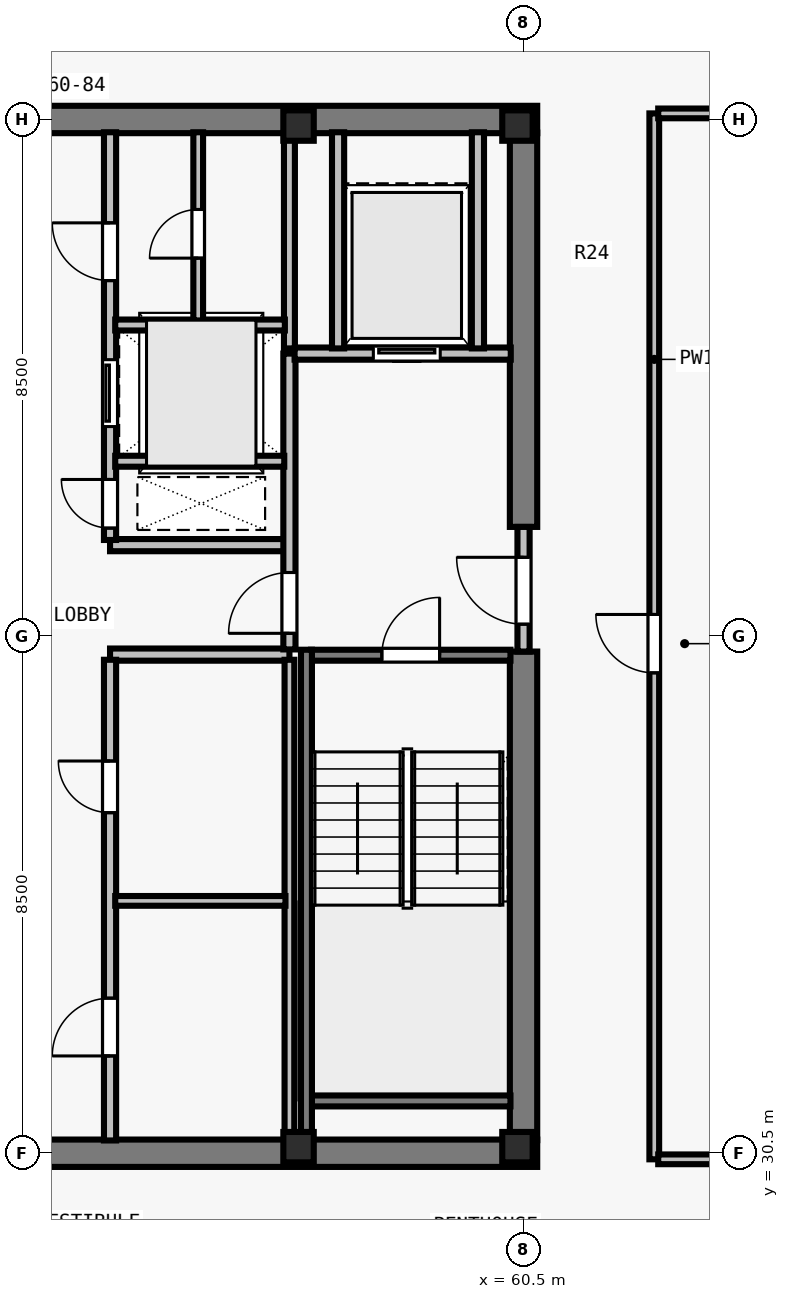
"""IFC4 building model, lengths in metres.
Left out: names, types, materials, properties, quantities, classifications, styles, units other than length and angle.
Written with IfcOpenShell. Run it as: python <this file> out.ifc"""

import sys

from ifc_helpers import new_model, si_unit, direction, frame, frame_2d, origin, origin_2d, place, context, subcontext, project, spatial, rectangle, i_section, extrude, element, fill, save


model = new_model("IFC4")
c1 = context("Model", 3, precision=1e-05, world=origin(), true_north=direction((0.0, 1.0)))
c2 = subcontext(c1, "Body", "Model", "MODEL_VIEW")
j1 = project(units=[si_unit("LENGTHUNIT", "METRE"), si_unit("PLANEANGLEUNIT", "RADIAN")], contexts=[c1])
p1 = place(None, origin())
s1 = spatial("IfcSite", under=j1, at=p1, CompositionType="ELEMENT")
p2 = place(p1, origin())
s2 = spatial("IfcBuilding", under=s1, at=p2, CompositionType="ELEMENT")
p3 = place(p2, frame((0.0, 0.0, 294.5)))
s3 = spatial("IfcBuildingStorey", under=s2, at=p3, CompositionType="ELEMENT", Elevation=294.5)
for number, where, z_axis, x_axis in (
    (1, (56.8, 30.6, 0.0), (0.0, 0.0, 1.0), (1.0, 0.0, 0.0)),
    (2, (60.4, 30.6, 0.0), (0.0, 0.0, 1.0), (1.0, 0.0, 0.0)),
    (3, (56.8, 47.4, 0.0), (0.0, 0.0, 1.0), (1.0, 0.0, 0.0)),
    (4, (60.4, 47.4, 0.0), (0.0, 0.0, 1.0), (1.0, 0.0, 0.0)),
):
    element("IfcColumn", number, at=place(p3, frame(where, z_axis=z_axis, x_axis=x_axis)), inside=s3, PredefinedType="COLUMN", context=c2, shape_type="SweptSolid", body=[
        extrude(i_section(OverallWidth=0.5, OverallDepth=0.5, WebThickness=0.028, FlangeThickness=0.045, at=origin_2d()), origin(), (0.0, 0.0, 1.0), 3.5),
    ])
for number, where, z_axis, x_axis in (
    (5, (43.275, 30.5, 0.0), (0.0, 0.0, 1.0), (1.0, 0.0, 0.0)),
    (6, (43.275, 47.5, 0.0), (0.0, 0.0, 1.0), (1.0, 0.0, 0.0)),
):
    element("IfcWall", number, at=place(p3, frame(where, z_axis=z_axis, x_axis=x_axis)), inside=s3, PredefinedType="SHEAR", context=c2, shape_type="SweptSolid", body=[
        extrude(rectangle(XDim=17.45, YDim=0.45, at=frame_2d((8.725, 0.0))), origin(), (0.0, 0.0, 1.0), 3.29),
    ])
p4 = place(p3, frame((60.5, 30.715, 0.0), z_axis=(0.0, 0.0, 1.0), x_axis=(0.0, 1.0, 0.0)))
e7 = element("IfcWall", 7, at=p4, inside=s3, PredefinedType="SHEAR", context=c2, shape_type="SweptSolid", body=[
    extrude(rectangle(XDim=8.035, YDim=0.45, at=frame_2d((4.018, 0.0))), origin(), (0.0, 0.0, 1.0), 3.29),
])
p5 = place(p3, frame((60.5, 40.8, 0.0), z_axis=(0.0, 0.0, 1.0), x_axis=(0.0, 1.0, 0.0)))
e8 = element("IfcWall", 8, at=p5, inside=s3, PredefinedType="SHEAR", context=c2, shape_type="SweptSolid", body=[
    extrude(rectangle(XDim=6.485, YDim=0.45, at=frame_2d((3.242, 0.0))), origin(), (0.0, 0.0, 1.0), 3.29),
])
for number, where, z_axis, x_axis in (
    (9, (53.7, 38.7, 0.0), (0.0, 0.0, 1.0), (1.0, 0.0, 0.0)),
    (10, (53.7, 40.5, 0.0), (0.0, 0.0, 1.0), (1.0, 0.0, 0.0)),
):
    element("IfcWall", number, at=place(p3, frame(where, z_axis=z_axis, x_axis=x_axis)), inside=s3, PredefinedType="SOLIDWALL", context=c2, shape_type="SweptSolid", body=[
        extrude(rectangle(XDim=2.95, YDim=0.2, at=frame_2d((1.475, 0.0))), origin(), (0.0, 0.0, 1.0), 3.29),
    ])
p6 = place(p3, frame((53.7, 30.71, 0.0), z_axis=(0.0, 0.0, 1.0), x_axis=(0.0, 1.0, 0.0)))
e11 = element("IfcWall", 11, at=p6, inside=s3, PredefinedType="SOLIDWALL", context=c2, shape_type="SweptSolid", body=[
    extrude(rectangle(XDim=7.905, YDim=0.2, at=frame_2d((3.953, 0.0))), origin(), (0.0, 0.0, 1.0), 3.29),
])
p7 = place(p6, frame((1.39, 0.0, 0.0)))
e12 = element("IfcOpeningElement", 12, at=p7, cuts=e11, PredefinedType="OPENING", context=c2, shape_type="SweptSolid", body=[
    extrude(rectangle(XDim=0.95, YDim=2.12, at=frame_2d((0.475, 1.06))), frame((0.0, 0.11, 0.0), z_axis=(0.0, -1.0, 0.0), x_axis=(1.0, 0.0, 0.0)), (0.0, 0.0, 1.0), 0.22),
])
p8 = place(p6, frame((5.39, 0.0, 0.0)))
e13 = element("IfcOpeningElement", 13, at=p8, cuts=e11, PredefinedType="OPENING", context=c2, shape_type="SweptSolid", body=[
    extrude(rectangle(XDim=0.85, YDim=2.12, at=frame_2d((0.425, 1.06))), frame((0.0, 0.11, 0.0), z_axis=(0.0, -1.0, 0.0), x_axis=(1.0, 0.0, 0.0)), (0.0, 0.0, 1.0), 0.22),
])
p9 = place(p3, frame((53.7, 40.585, 0.0), z_axis=(0.0, 0.0, 1.0), x_axis=(0.0, 1.0, 0.0)))
e14 = element("IfcWall", 14, at=p9, inside=s3, PredefinedType="SOLIDWALL", context=c2, shape_type="SweptSolid", body=[
    extrude(rectangle(XDim=6.705, YDim=0.2, at=frame_2d((3.353, 0.0))), origin(), (0.0, 0.0, 1.0), 3.29),
])
p10 = place(p9, frame((0.195, 0.0, 0.0)))
e15 = element("IfcOpeningElement", 15, at=p10, cuts=e14, PredefinedType="OPENING", context=c2, shape_type="SweptSolid", body=[
    extrude(rectangle(XDim=0.8, YDim=2.08, at=frame_2d((0.4, 1.04))), frame((0.0, 0.11, 0.0), z_axis=(0.0, -1.0, 0.0), x_axis=(1.0, 0.0, 0.0)), (0.0, 0.0, 1.0), 0.22),
])
p11 = place(p9, frame((1.865, 0.0, 0.0)))
e16 = element("IfcOpeningElement", 16, at=p11, cuts=e14, PredefinedType="OPENING", context=c2, shape_type="SweptSolid", body=[
    extrude(rectangle(XDim=1.1, YDim=2.2, at=frame_2d((0.55, 1.1))), frame((0.0, 0.11, 0.0), z_axis=(0.0, -1.0, 0.0), x_axis=(1.0, 0.0, 0.0)), (0.0, 0.0, 1.0), 0.22),
])
p12 = place(p9, frame((4.265, 0.0, 0.0)))
e17 = element("IfcOpeningElement", 17, at=p12, cuts=e14, PredefinedType="OPENING", context=c2, shape_type="SweptSolid", body=[
    extrude(rectangle(XDim=0.95, YDim=2.12, at=frame_2d((0.475, 1.06))), frame((0.0, 0.11, 0.0), z_axis=(0.0, -1.0, 0.0), x_axis=(1.0, 0.0, 0.0)), (0.0, 0.0, 1.0), 0.22),
])
p13 = place(p3, frame((60.5, 38.75, 0.0), z_axis=(0.0, 0.0, 1.0), x_axis=(0.0, 1.0, 0.0)))
e18 = element("IfcWall", 18, at=p13, inside=s3, PredefinedType="SOLIDWALL", context=c2, shape_type="SweptSolid", body=[
    extrude(rectangle(XDim=2.05, YDim=0.2, at=frame_2d((1.025, 0.0))), origin(), (0.0, 0.0, 1.0), 3.29),
])
p14 = place(p13, frame((0.45, 0.0, 0.0)))
e19 = element("IfcOpeningElement", 19, at=p14, cuts=e18, PredefinedType="OPENING", context=c2, shape_type="SweptSolid", body=[
    extrude(rectangle(XDim=1.1, YDim=2.15, at=frame_2d((0.55, 1.075))), frame((0.0, 0.11, 0.0), z_axis=(0.0, -1.0, 0.0), x_axis=(1.0, 0.0, 0.0)), (0.0, 0.0, 1.0), 0.22),
])
p15 = place(p3, frame((56.65, 38.785, 0.0), z_axis=(0.0, 0.0, 1.0), x_axis=(0.0, 1.0, 0.0)))
e20 = element("IfcWall", 20, at=p15, inside=s3, PredefinedType="SOLIDWALL", context=c2, shape_type="SweptSolid", body=[
    extrude(rectangle(XDim=4.865, YDim=0.2, at=frame_2d((2.433, 0.0))), origin(), (0.0, 0.0, 1.0), 3.29),
])
p16 = place(p15, frame((0.265, 0.0, 0.0)))
e21 = element("IfcOpeningElement", 21, at=p16, cuts=e20, PredefinedType="OPENING", context=c2, shape_type="SweptSolid", body=[
    extrude(rectangle(XDim=1.0, YDim=2.15, at=frame_2d((0.5, 1.075))), frame((0.0, 0.11, 0.0), z_axis=(0.0, -1.0, 0.0), x_axis=(1.0, 0.0, 0.0)), (0.0, 0.0, 1.0), 0.22),
])
p17 = place(p3, frame((56.735, 43.65, 0.0), z_axis=(0.0, 0.0, 1.0), x_axis=(1.0, 0.0, 0.0)))
e22 = element("IfcWall", 22, at=p17, inside=s3, PredefinedType="SOLIDWALL", context=c2, shape_type="SweptSolid", body=[
    extrude(rectangle(XDim=3.555, YDim=0.2, at=frame_2d((1.777, 0.0))), origin(), (0.0, 0.0, 1.0), 3.29),
])
p18 = place(p17, frame((1.295, 0.0, 0.0)))
e23 = element("IfcOpeningElement", 23, at=p18, cuts=e22, PredefinedType="OPENING", context=c2, shape_type="SweptSolid", body=[
    extrude(rectangle(XDim=1.1, YDim=2.2, at=frame_2d((0.55, 1.1))), frame((0.0, 0.11, 0.0), z_axis=(0.0, -1.0, 0.0), x_axis=(1.0, 0.0, 0.0)), (0.0, 0.0, 1.0), 0.22),
])
for number, where, z_axis, x_axis in (
    (24, (57.45, 43.735, 0.0), (0.0, 0.0, 1.0), (0.0, 1.0, 0.0)),
    (25, (59.75, 43.735, 0.0), (0.0, 0.0, 1.0), (0.0, 1.0, 0.0)),
):
    element("IfcWall", number, at=place(p3, frame(where, z_axis=z_axis, x_axis=x_axis)), inside=s3, PredefinedType="SOLIDWALL", context=c2, shape_type="SweptSolid", body=[
        extrude(rectangle(XDim=3.555, YDim=0.2, at=frame_2d((1.777, 0.0))), origin(), (0.0, 0.0, 1.0), 3.29),
    ])
p19 = place(p3, frame((56.65, 30.71, 0.0), z_axis=(0.0, 0.0, 1.0), x_axis=(0.0, 1.0, 0.0)))
e26 = element("IfcWall", 26, at=p19, inside=s3, PredefinedType="PARTITIONING", context=c2, shape_type="SweptSolid", body=[
    extrude(rectangle(XDim=7.905, YDim=0.16, at=frame_2d((3.953, 0.0))), origin(), (0.0, 0.0, 1.0), 3.29),
])
p20 = place(p3, frame((53.785, 34.65, 0.0), z_axis=(0.0, 0.0, 1.0), x_axis=(1.0, 0.0, 0.0)))
e27 = element("IfcWall", 27, at=p20, inside=s3, PredefinedType="PARTITIONING", context=c2, shape_type="SweptSolid", body=[
    extrude(rectangle(XDim=2.8, YDim=0.16, at=frame_2d((1.4, 0.0))), origin(), (0.0, 0.0, 1.0), 3.29),
])
p21 = place(p3, frame((56.65, 43.735, 0.0), z_axis=(0.0, 0.0, 1.0), x_axis=(0.0, 1.0, 0.0)))
e28 = element("IfcWall", 28, at=p21, inside=s3, PredefinedType="SOLIDWALL", context=c2, shape_type="SweptSolid", body=[
    extrude(rectangle(XDim=3.555, YDim=0.18, at=frame_2d((1.777, 0.0))), origin(), (0.0, 0.0, 1.0), 3.29),
])
p22 = place(p3, frame((53.785, 41.88, 0.0), z_axis=(0.0, 0.0, 1.0), x_axis=(1.0, 0.0, 0.0)))
e29 = element("IfcWall", 29, at=p22, inside=s3, PredefinedType="SOLIDWALL", context=c2, shape_type="SweptSolid", body=[
    extrude(rectangle(XDim=2.78, YDim=0.18, at=frame_2d((1.39, 0.0))), origin(), (0.0, 0.0, 1.0), 3.29),
])
p23 = place(p3, frame((53.785, 44.12, 0.0), z_axis=(0.0, 0.0, 1.0), x_axis=(1.0, 0.0, 0.0)))
e30 = element("IfcWall", 30, at=p23, inside=s3, PredefinedType="SOLIDWALL", context=c2, shape_type="SweptSolid", body=[
    extrude(rectangle(XDim=2.79, YDim=0.18, at=frame_2d((1.395, 0.0))), origin(), (0.0, 0.0, 1.0), 3.29),
])
p24 = place(p3, frame((55.15, 44.195, 0.0), z_axis=(0.0, 0.0, 1.0), x_axis=(0.0, 1.0, 0.0)))
e31 = element("IfcWall", 31, at=p24, inside=s3, PredefinedType="PARTITIONING", context=c2, shape_type="SweptSolid", body=[
    extrude(rectangle(XDim=3.095, YDim=0.16, at=frame_2d((1.547, 0.0))), origin(), (0.0, 0.0, 1.0), 3.29),
])
p25 = place(p24, frame((1.025, 0.0, 0.0)))
e32 = element("IfcOpeningElement", 32, at=p25, cuts=e31, PredefinedType="OPENING", context=c2, shape_type="SweptSolid", body=[
    extrude(rectangle(XDim=0.8, YDim=2.1, at=frame_2d((0.4, 1.05))), frame((0.0, 0.09, 0.0), z_axis=(0.0, -1.0, 0.0), x_axis=(1.0, 0.0, 0.0)), (0.0, 0.0, 1.0), 0.18),
])
p26 = place(p3, frame((62.65, 30.4, 0.0), z_axis=(0.0, 0.0, 1.0), x_axis=(0.0, 1.0, 0.0)))
e33 = element("IfcWall", 33, at=p26, inside=s3, PredefinedType="PARTITIONING", context=c2, shape_type="SweptSolid", body=[
    extrude(rectangle(XDim=17.2, YDim=0.16, at=frame_2d((8.6, 0.0))), origin(), (0.0, 0.0, 1.0), 3.29),
])
p27 = place(p26, frame((8.0, 0.0, 0.0)))
e34 = element("IfcOpeningElement", 34, at=p27, cuts=e33, PredefinedType="OPENING", context=c2, shape_type="SweptSolid", body=[
    extrude(rectangle(XDim=0.96, YDim=2.12, at=frame_2d((0.48, 1.06))), frame((0.0, 0.09, 0.0), z_axis=(0.0, -1.0, 0.0), x_axis=(1.0, 0.0, 0.0)), (0.0, 0.0, 1.0), 0.18),
])
p28 = place(p3, frame((62.715, 30.4, 0.0), z_axis=(0.0, 0.0, 1.0), x_axis=(1.0, 0.0, 0.0)))
e35 = element("IfcWall", 35, at=p28, inside=s3, PredefinedType="PARTITIONING", context=c2, shape_type="SweptSolid", body=[
    extrude(rectangle(XDim=10.015, YDim=0.16, at=frame_2d((5.007, 0.0))), origin(), (0.0, 0.0, 1.0), 3.29),
])
p29 = place(p3, frame((62.715, 47.6, 0.0), z_axis=(0.0, 0.0, 1.0), x_axis=(1.0, 0.0, 0.0)))
e36 = element("IfcWall", 36, at=p29, inside=s3, PredefinedType="PARTITIONING", context=c2, shape_type="SweptSolid", body=[
    extrude(rectangle(XDim=10.0, YDim=0.16, at=frame_2d((5.0, 0.0))), origin(), (0.0, 0.0, 1.0), 3.29),
])
p30 = place(p3, frame((57.005, 38.69, 0.0), z_axis=(0.0, 0.0, 1.0), x_axis=(1.0, 0.0, 0.0)))
e37 = element("IfcWall", 37, at=p30, inside=s3, PredefinedType="SOLIDWALL", context=c2, shape_type="SweptSolid", body=[
    extrude(rectangle(XDim=3.28, YDim=0.18, at=frame_2d((1.64, 0.0))), origin(), (0.0, 0.0, 1.0), 3.29),
])
p31 = place(p30, frame((1.165, 0.0, 0.0)))
e38 = element("IfcOpeningElement", 38, at=p31, cuts=e37, PredefinedType="OPENING", context=c2, shape_type="SweptSolid", body=[
    extrude(rectangle(XDim=0.95, YDim=2.15, at=frame_2d((0.475, 1.075))), frame((0.0, 0.1, 0.0), z_axis=(0.0, -1.0, 0.0), x_axis=(1.0, 0.0, 0.0)), (0.0, 0.0, 1.0), 0.2),
])
p32 = place(p3, frame((57.005, 31.36, 0.0), z_axis=(0.0, 0.0, 1.0), x_axis=(1.0, 0.0, 0.0)))
e39 = element("IfcWall", 39, at=p32, inside=s3, PredefinedType="SOLIDWALL", context=c2, shape_type="SweptSolid", body=[
    extrude(rectangle(XDim=3.28, YDim=0.18, at=frame_2d((1.64, 0.0))), origin(), (0.0, 0.0, 1.0), 3.29),
])
p33 = place(p3, frame((56.93, 38.78, 0.0), z_axis=(0.0, 0.0, 1.0), x_axis=(0.0, -1.0, 0.0)))
e40 = element("IfcWall", 40, at=p33, inside=s3, PredefinedType="SOLIDWALL", context=c2, shape_type="SweptSolid", body=[
    extrude(rectangle(XDim=8.067, YDim=0.18, at=frame_2d((4.034, 0.0))), origin(), (0.0, 0.0, 1.0), 3.29),
])
p34 = place(p14, origin())
e41 = element("IfcDoor", 41, at=p34, inside=s3, OperationType="SINGLE_SWING_RIGHT", PredefinedType="DOOR", context=c2, shape_type="SweptSolid", body=[
    extrude(rectangle(XDim=1.1, YDim=2.15, at=frame_2d((0.55, 1.075))), frame((0.0, 0.025, 0.0), z_axis=(0.0, -1.0, 0.0), x_axis=(1.0, 0.0, 0.0)), (0.0, 0.0, 1.0), 0.05),
])
fill(e19, e41)
p35 = place(p16, origin())
e42 = element("IfcDoor", 42, at=p35, inside=s3, OperationType="SINGLE_SWING_LEFT", PredefinedType="DOOR", context=c2, shape_type="SweptSolid", body=[
    extrude(rectangle(XDim=1.0, YDim=2.15, at=frame_2d((0.5, 1.075))), frame((0.0, 0.025, 0.0), z_axis=(0.0, -1.0, 0.0), x_axis=(1.0, 0.0, 0.0)), (0.0, 0.0, 1.0), 0.05),
])
fill(e21, e42)
p36 = place(p18, origin())
e43 = element("IfcDoor", 43, at=p36, inside=s3, OperationType="SLIDING_TO_LEFT", PredefinedType="DOOR", context=c2, shape_type="SweptSolid", body=[
    extrude(rectangle(XDim=1.1, YDim=2.2, at=frame_2d((0.55, 1.1))), frame((0.0, 0.025, 0.0), z_axis=(0.0, -1.0, 0.0), x_axis=(1.0, 0.0, 0.0)), (0.0, 0.0, 1.0), 0.05),
])
fill(e23, e43)
p37 = place(p7, origin())
e44 = element("IfcDoor", 44, at=p37, inside=s3, OperationType="SINGLE_SWING_LEFT", PredefinedType="DOOR", context=c2, shape_type="SweptSolid", body=[
    extrude(rectangle(XDim=0.95, YDim=2.12, at=frame_2d((0.475, 1.06))), frame((0.0, 0.025, 0.0), z_axis=(0.0, -1.0, 0.0), x_axis=(1.0, 0.0, 0.0)), (0.0, 0.0, 1.0), 0.05),
])
fill(e12, e44)
p38 = place(p8, origin())
e45 = element("IfcDoor", 45, at=p38, inside=s3, OperationType="SINGLE_SWING_RIGHT", PredefinedType="DOOR", context=c2, shape_type="SweptSolid", body=[
    extrude(rectangle(XDim=0.85, YDim=2.12, at=frame_2d((0.425, 1.06))), frame((0.0, 0.025, 0.0), z_axis=(0.0, -1.0, 0.0), x_axis=(1.0, 0.0, 0.0)), (0.0, 0.0, 1.0), 0.05),
])
fill(e13, e45)
p39 = place(p10, origin())
e46 = element("IfcDoor", 46, at=p39, inside=s3, OperationType="SINGLE_SWING_RIGHT", PredefinedType="DOOR", context=c2, shape_type="SweptSolid", body=[
    extrude(rectangle(XDim=0.8, YDim=2.08, at=frame_2d((0.4, 1.04))), frame((0.0, 0.025, 0.0), z_axis=(0.0, -1.0, 0.0), x_axis=(1.0, 0.0, 0.0)), (0.0, 0.0, 1.0), 0.05),
])
fill(e15, e46)
p40 = place(p11, origin())
e47 = element("IfcDoor", 47, at=p40, inside=s3, OperationType="SLIDING_TO_LEFT", PredefinedType="DOOR", context=c2, shape_type="SweptSolid", body=[
    extrude(rectangle(XDim=1.1, YDim=2.2, at=frame_2d((0.55, 1.1))), frame((0.0, 0.025, 0.0), z_axis=(0.0, -1.0, 0.0), x_axis=(1.0, 0.0, 0.0)), (0.0, 0.0, 1.0), 0.05),
])
fill(e16, e47)
p41 = place(p12, origin())
e48 = element("IfcDoor", 48, at=p41, inside=s3, OperationType="SINGLE_SWING_RIGHT", PredefinedType="DOOR", context=c2, shape_type="SweptSolid", body=[
    extrude(rectangle(XDim=0.95, YDim=2.12, at=frame_2d((0.475, 1.06))), frame((0.0, 0.025, 0.0), z_axis=(0.0, -1.0, 0.0), x_axis=(1.0, 0.0, 0.0)), (0.0, 0.0, 1.0), 0.05),
])
fill(e17, e48)
p42 = place(p25, origin())
e49 = element("IfcDoor", 49, at=p42, inside=s3, OperationType="SINGLE_SWING_LEFT", PredefinedType="DOOR", context=c2, shape_type="SweptSolid", body=[
    extrude(rectangle(XDim=0.8, YDim=2.1, at=frame_2d((0.4, 1.05))), frame((0.0, 0.025, 0.0), z_axis=(0.0, -1.0, 0.0), x_axis=(1.0, 0.0, 0.0)), (0.0, 0.0, 1.0), 0.05),
])
fill(e32, e49)
p43 = place(p27, origin())
e50 = element("IfcDoor", 50, at=p43, inside=s3, OperationType="SINGLE_SWING_RIGHT", PredefinedType="DOOR", context=c2, shape_type="SweptSolid", body=[
    extrude(rectangle(XDim=0.96, YDim=2.12, at=frame_2d((0.48, 1.06))), frame((0.0, 0.025, 0.0), z_axis=(0.0, -1.0, 0.0), x_axis=(1.0, 0.0, 0.0)), (0.0, 0.0, 1.0), 0.05),
])
fill(e34, e50)
p44 = place(p31, origin())
e51 = element("IfcDoor", 51, at=p44, inside=s3, OperationType="SINGLE_SWING_RIGHT", PredefinedType="DOOR", context=c2, shape_type="SweptSolid", body=[
    extrude(rectangle(XDim=0.95, YDim=2.15, at=frame_2d((0.475, 1.075))), frame((0.0, 0.025, 0.0), z_axis=(0.0, -1.0, 0.0), x_axis=(1.0, 0.0, 0.0)), (0.0, 0.0, 1.0), 0.05),
])
fill(e38, e51)
save(model, sys.argv[1])
